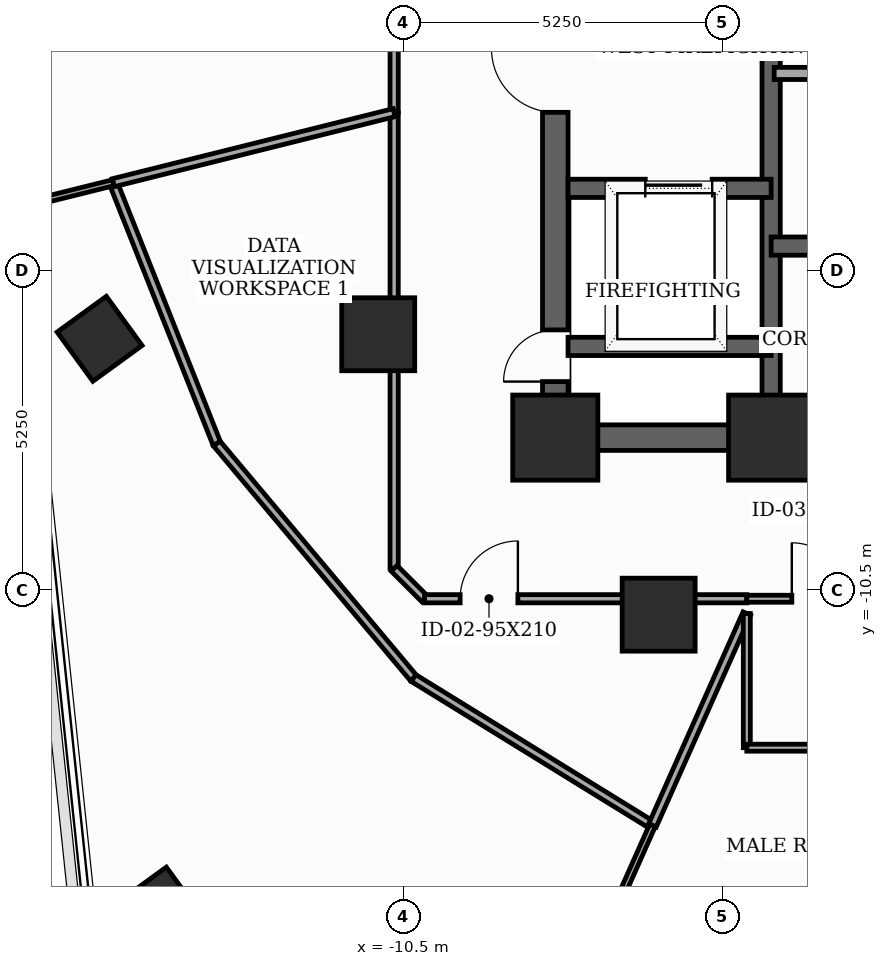
"""IFC4 building model, lengths in metres.
Left out: names, types, materials, properties, quantities, classifications, styles, units other than length and angle.
Written with IfcOpenShell. Run it as: python <this file> out.ifc"""

import sys

from ifc_helpers import new_model, si_unit, direction, frame, frame_2d, origin, origin_2d, place, context, subcontext, project, spatial, rectangle, extrude, element, fill, save


model = new_model("IFC4")
c1 = context("Model", 3, precision=1e-05, world=origin(), true_north=direction((0.0, 1.0)))
c2 = subcontext(c1, "Body", "Model", "MODEL_VIEW")
j1 = project(units=[si_unit("LENGTHUNIT", "METRE"), si_unit("PLANEANGLEUNIT", "RADIAN")], contexts=[c1])
p1 = place(None, origin())
s1 = spatial("IfcSite", under=j1, at=p1, CompositionType="ELEMENT")
p2 = place(p1, origin())
s2 = spatial("IfcBuilding", under=s1, at=p2, CompositionType="ELEMENT")
p3 = place(p2, frame((0.0, 0.0, 176.8)))
s3 = spatial("IfcBuildingStorey", under=s2, at=p3, CompositionType="ELEMENT", Elevation=176.8)
for number, where, z_axis, x_axis in (
    (1, (-8.0, -8.0, 0.0), (0.0, 0.0, 1.0), (1.0, 0.0, 0.0)),
    (2, (-4.45, -8.0, 0.0), (0.0, 0.0, 1.0), (1.0, 0.0, 0.0)),
):
    element("IfcColumn", number, at=place(p3, frame(where, z_axis=z_axis, x_axis=x_axis)), inside=s3, PredefinedType="COLUMN", context=c2, shape_type="SweptSolid", body=[
        extrude(rectangle(XDim=1.4, YDim=1.4, at=origin_2d()), origin(), (0.0, 0.0, 1.0), 3.7),
    ])
for number, where, z_axis, x_axis in (
    (3, (-10.912, -6.3, 0.0), (0.0, 0.0, 1.0), (1.0, 0.0, 0.0)),
    (4, (-6.3, -10.912, 0.0), (0.0, 0.0, 1.0), (1.0, 0.0, 0.0)),
):
    element("IfcColumn", number, at=place(p3, frame(where, z_axis=z_axis, x_axis=x_axis)), inside=s3, PredefinedType="COLUMN", context=c2, shape_type="SweptSolid", body=[
        extrude(rectangle(XDim=1.2, YDim=1.2, at=origin_2d()), origin(), (0.0, 0.0, 1.0), 3.7),
    ])
for number, where, z_axis, x_axis in (
    (5, (-15.494, -6.375, 0.0), (0.0, 0.0, 1.0), (0.809, 0.588, 0.0)),
    (6, (-14.507, -15.763, 0.0), (0.0, 0.0, 1.0), (0.809, 0.588, 0.0)),
):
    element("IfcColumn", number, at=place(p3, frame(where, z_axis=z_axis, x_axis=x_axis)), inside=s3, PredefinedType="COLUMN", context=c2, shape_type="SweptSolid", body=[
        extrude(rectangle(XDim=1.0, YDim=1.0, at=origin_2d()), origin(), (0.0, 0.0, 1.0), 3.7),
    ])
p4 = place(p3, frame((-8.0, -8.0, 0.0), z_axis=(0.0, 0.0, 1.0), x_axis=(0.0, 1.0, 0.0)))
e7 = element("IfcWall", 7, at=p4, inside=s3, PredefinedType="SHEAR", context=c2, shape_type="SweptSolid", body=[
    extrude(rectangle(XDim=16.0, YDim=0.42, at=frame_2d((8.0, 0.0))), origin(), (0.0, 0.0, 1.0), 3.5),
])
p5 = place(p4, frame((0.922, 0.0, 0.0)))
e8 = element("IfcOpeningElement", 8, at=p5, cuts=e7, PredefinedType="OPENING", context=c2, shape_type="SweptSolid", body=[
    extrude(rectangle(XDim=0.85, YDim=2.02, at=frame_2d((0.425, 1.01))), frame((0.0, 0.22, 0.0), z_axis=(0.0, -1.0, 0.0), x_axis=(1.0, 0.0, 0.0)), (0.0, 0.0, 1.0), 0.44),
])
p6 = place(p4, frame((5.35, 0.0, 0.0)))
e9 = element("IfcOpeningElement", 9, at=p6, cuts=e7, PredefinedType="OPENING", context=c2, shape_type="SweptSolid", body=[
    extrude(rectangle(XDim=1.05, YDim=2.15, at=frame_2d((0.525, 1.075))), frame((0.0, 0.22, 0.0), z_axis=(0.0, -1.0, 0.0), x_axis=(1.0, 0.0, 0.0)), (0.0, 0.0, 1.0), 0.44),
])
p7 = place(p3, frame((-8.0, -8.0, 0.0), z_axis=(0.0, 0.0, 1.0), x_axis=(1.0, 0.0, 0.0)))
e10 = element("IfcWall", 10, at=p7, inside=s3, PredefinedType="SHEAR", context=c2, shape_type="SweptSolid", body=[
    extrude(rectangle(XDim=16.0, YDim=0.42, at=frame_2d((8.0, 0.0))), origin(), (0.0, 0.0, 1.0), 3.5),
])
p8 = place(p7, frame((4.449, 0.0, 0.0)))
e11 = element("IfcOpeningElement", 11, at=p8, cuts=e10, PredefinedType="OPENING", context=c2, shape_type="SweptSolid", body=[
    extrude(rectangle(XDim=0.85, YDim=2.02, at=frame_2d((0.425, 1.01))), frame((0.0, 0.22, 0.0), z_axis=(0.0, -1.0, 0.0), x_axis=(1.0, 0.0, 0.0)), (0.0, 0.0, 1.0), 0.44),
])
p9 = place(p7, frame((6.49, 0.0, 0.0)))
e12 = element("IfcOpeningElement", 12, at=p9, cuts=e10, PredefinedType="OPENING", context=c2, shape_type="SweptSolid", body=[
    extrude(rectangle(XDim=0.85, YDim=2.02, at=frame_2d((0.425, 1.01))), frame((0.0, 0.22, 0.0), z_axis=(0.0, -1.0, 0.0), x_axis=(1.0, 0.0, 0.0)), (0.0, 0.0, 1.0), 0.44),
])
p10 = place(p7, frame((8.69, 0.0, 0.0)))
e13 = element("IfcOpeningElement", 13, at=p10, cuts=e10, PredefinedType="OPENING", context=c2, shape_type="SweptSolid", body=[
    extrude(rectangle(XDim=0.85, YDim=2.02, at=frame_2d((0.425, 1.01))), frame((0.0, 0.22, 0.0), z_axis=(0.0, -1.0, 0.0), x_axis=(1.0, 0.0, 0.0)), (0.0, 0.0, 1.0), 0.44),
])
p11 = place(p7, frame((10.701, 0.0, 0.0)))
e14 = element("IfcOpeningElement", 14, at=p11, cuts=e10, PredefinedType="OPENING", context=c2, shape_type="SweptSolid", body=[
    extrude(rectangle(XDim=0.85, YDim=2.02, at=frame_2d((0.425, 1.01))), frame((0.0, 0.22, 0.0), z_axis=(0.0, -1.0, 0.0), x_axis=(1.0, 0.0, 0.0)), (0.0, 0.0, 1.0), 0.44),
])
p12 = place(p3, frame((-4.45, -7.79, 0.0), z_axis=(0.0, 0.0, 1.0), x_axis=(0.0, 1.0, 0.0)))
e15 = element("IfcWall", 15, at=p12, inside=s3, PredefinedType="SHEAR", context=c2, shape_type="SweptSolid", body=[
    extrude(rectangle(XDim=15.58, YDim=0.3, at=frame_2d((7.79, 0.0))), origin(), (0.0, 0.0, 1.0), 3.5),
])
p13 = place(p3, frame((-7.79, -3.9, 0.0), z_axis=(0.0, 0.0, 1.0), x_axis=(1.0, 0.0, 0.0)))
e16 = element("IfcWall", 16, at=p13, inside=s3, PredefinedType="SHEAR", context=c2, shape_type="SweptSolid", body=[
    extrude(rectangle(XDim=3.34, YDim=0.3, at=frame_2d((1.67, 0.0))), origin(), (0.0, 0.0, 1.0), 3.5),
])
p14 = place(p13, frame((1.27, 0.0, 0.0)))
e17 = element("IfcOpeningElement", 17, at=p14, cuts=e16, PredefinedType="OPENING", context=c2, shape_type="SweptSolid", body=[
    extrude(rectangle(XDim=1.1, YDim=2.1, at=frame_2d((0.55, 1.05))), frame((0.0, 0.16, 0.0), z_axis=(0.0, -1.0, 0.0), x_axis=(1.0, 0.0, 0.0)), (0.0, 0.0, 1.0), 0.32),
])
p15 = place(p3, frame((-7.79, -6.5, 0.0), z_axis=(0.0, 0.0, 1.0), x_axis=(1.0, 0.0, 0.0)))
e18 = element("IfcWall", 18, at=p15, inside=s3, PredefinedType="SHEAR", context=c2, shape_type="SweptSolid", body=[
    extrude(rectangle(XDim=3.34, YDim=0.3, at=frame_2d((1.67, 0.0))), origin(), (0.0, 0.0, 1.0), 3.5),
])
p16 = place(p3, frame((-4.45, -4.85, 0.0), z_axis=(0.0, 0.0, 1.0), x_axis=(1.0, 0.0, 0.0)))
e19 = element("IfcWall", 19, at=p16, inside=s3, PredefinedType="SHEAR", context=c2, shape_type="SweptSolid", body=[
    extrude(rectangle(XDim=8.9, YDim=0.3, at=frame_2d((4.45, 0.0))), origin(), (0.0, 0.0, 1.0), 3.5),
])
p17 = place(p3, frame((-4.4, -2.01, 0.0), z_axis=(0.0, 0.0, 1.0), x_axis=(1.0, 0.0, 0.0)))
e20 = element("IfcWall", 20, at=p17, inside=s3, PredefinedType="SOLIDWALL", context=c2, shape_type="SweptSolid", body=[
    extrude(rectangle(XDim=2.68, YDim=0.2, at=frame_2d((1.34, 0.0))), origin(), (0.0, 0.0, 1.0), 3.5),
])
p18 = place(p3, frame((-10.65, -2.655, 0.0), z_axis=(0.0, 0.0, 1.0), x_axis=(0.0, -1.0, 0.0)))
e21 = element("IfcWall", 21, at=p18, inside=s3, PredefinedType="PARTITIONING", context=c2, shape_type="SweptSolid", body=[
    extrude(rectangle(XDim=7.495, YDim=0.135, at=frame_2d((3.748, 0.0))), origin(), (0.0, 0.0, 1.0), 2.885),
])
p19 = place(p3, frame((-10.65, -10.15, 0.0), z_axis=(0.0, 0.0, 1.0), x_axis=(0.707106781187, -0.707106781187, 0.0)))
e22 = element("IfcWall", 22, at=p19, inside=s3, PredefinedType="PARTITIONING", context=c2, shape_type="SweptSolid", body=[
    extrude(rectangle(XDim=0.707, YDim=0.135, at=frame_2d((0.354, 0.0))), origin(), (0.0, 0.0, 1.0), 3.5),
])
p20 = place(p3, frame((-10.15, -10.65, 0.0), z_axis=(0.0, 0.0, 1.0), x_axis=(1.0, 0.0, 0.0)))
e23 = element("IfcWall", 23, at=p20, inside=s3, PredefinedType="PARTITIONING", context=c2, shape_type="SweptSolid", body=[
    extrude(rectangle(XDim=5.3, YDim=0.135, at=frame_2d((2.65, 0.0))), origin(), (0.0, 0.0, 1.0), 2.885),
])
p21 = place(p20, frame((0.585, 0.0, 0.0)))
e24 = element("IfcOpeningElement", 24, at=p21, cuts=e23, PredefinedType="OPENING", context=c2, shape_type="SweptSolid", body=[
    extrude(rectangle(XDim=0.95, YDim=2.1, at=frame_2d((0.475, 1.05))), frame((0.0, 0.077, 0.0), z_axis=(0.0, -1.0, 0.0), x_axis=(1.0, 0.0, 0.0)), (0.0, 0.0, 1.0), 0.155),
])
p22 = place(p3, frame((-4.85, -10.65, 0.0), z_axis=(0.0, 0.0, 1.0), x_axis=(1.0, 0.0, 0.0)))
e25 = element("IfcWall", 25, at=p22, inside=s3, PredefinedType="PARTITIONING", context=c2, shape_type="SweptSolid", body=[
    extrude(rectangle(XDim=2.4, YDim=0.115, at=frame_2d((1.2, 0.0))), origin(), (0.0, 0.0, 1.0), 3.5),
])
p23 = place(p22, frame((0.74, 0.0, 0.0)))
e26 = element("IfcOpeningElement", 26, at=p23, cuts=e25, PredefinedType="OPENING", context=c2, shape_type="SweptSolid", body=[
    extrude(rectangle(XDim=0.92, YDim=2.1, at=frame_2d((0.46, 1.05))), frame((0.0, 0.067, 0.0), z_axis=(0.0, -1.0, 0.0), x_axis=(1.0, 0.0, 0.0)), (0.0, 0.0, 1.0), 0.135),
])
p24 = place(p3, frame((-10.65, 10.15, 0.0), z_axis=(0.0, 0.0, 1.0), x_axis=(0.0, -1.0, 0.0)))
e27 = element("IfcWall", 27, at=p24, inside=s3, PredefinedType="PARTITIONING", context=c2, shape_type="SweptSolid", body=[
    extrude(rectangle(XDim=12.805, YDim=0.135, at=frame_2d((6.402, 0.0))), origin(), (0.0, 0.0, 1.0), 2.885),
])
p25 = place(p24, frame((5.927, 0.0, 0.0)))
e28 = element("IfcOpeningElement", 28, at=p25, cuts=e27, PredefinedType="OPENING", context=c2, shape_type="SweptSolid", body=[
    extrude(rectangle(XDim=0.95, YDim=2.1, at=frame_2d((0.475, 1.05))), frame((0.0, 0.077, 0.0), z_axis=(0.0, -1.0, 0.0), x_axis=(1.0, 0.0, 0.0)), (0.0, 0.0, 1.0), 0.155),
])
p26 = place(p3, frame((-15.271, -3.808, 0.0), z_axis=(0.0, 0.0, 1.0), x_axis=(0.369182774414, -0.929356809345, 0.0)))
e29 = element("IfcWall", 29, at=p26, inside=s3, PredefinedType="PARTITIONING", context=c2, shape_type="SweptSolid", body=[
    extrude(rectangle(XDim=4.616, YDim=0.135, at=frame_2d((2.308, 0.0))), origin(), (0.0, 0.0, 1.0), 2.885),
])
p27 = place(p3, frame((-13.567, -8.098, 0.0), z_axis=(0.0, 0.0, 1.0), x_axis=(0.642704085781, -0.766114520239, 0.0)))
e30 = element("IfcWall", 30, at=p27, inside=s3, PredefinedType="PARTITIONING", context=c2, shape_type="SweptSolid", body=[
    extrude(rectangle(XDim=5.035, YDim=0.135, at=frame_2d((2.517, 0.0))), origin(), (0.0, 0.0, 1.0), 3.5),
])
p28 = place(p3, frame((-10.331, -11.955, 0.0), z_axis=(0.0, 0.0, 1.0), x_axis=(0.851171263557, -0.524888064347, 0.0)))
e31 = element("IfcWall", 31, at=p28, inside=s3, PredefinedType="PARTITIONING", context=c2, shape_type="SweptSolid", body=[
    extrude(rectangle(XDim=4.616, YDim=0.135, at=frame_2d((2.308, 0.0))), origin(), (0.0, 0.0, 1.0), 2.885),
])
p29 = place(p3, frame((-6.402, -14.378, 0.0), z_axis=(0.0, 0.0, 1.0), x_axis=(0.406833086098, 0.913502512343, 0.0)))
e32 = element("IfcWall", 32, at=p29, inside=s3, PredefinedType="PARTITIONING", context=c2, shape_type="SweptSolid", body=[
    extrude(rectangle(XDim=3.815, YDim=0.135, at=frame_2d((1.907, 0.0))), origin(), (0.0, 0.0, 1.0), 2.885),
])
p30 = place(p3, frame((-10.65, -2.655, 0.0), z_axis=(0.0, 0.0, 1.0), x_axis=(-0.970250953753, -0.242101397643, 0.0)))
e33 = element("IfcWall", 33, at=p30, inside=s3, PredefinedType="PARTITIONING", context=c2, shape_type="SweptSolid", body=[
    extrude(rectangle(XDim=4.763, YDim=0.135, at=frame_2d((2.381, 0.0))), origin(), (0.0, 0.0, 1.0), 2.885),
])
p31 = place(p3, frame((-12.555, -28.199, 0.0), z_axis=(0.0, 0.0, 1.0), x_axis=(0.406672919663, 0.913573826471, 0.0)))
e34 = element("IfcWall", 34, at=p31, inside=s3, PredefinedType="MOVABLE", context=c2, shape_type="SweptSolid", body=[
    extrude(rectangle(XDim=15.129, YDim=0.1, at=frame_2d((7.564, 0.0))), origin(), (0.0, 0.0, 1.0), 2.985),
])
p32 = place(p31, frame((7.104, 0.0, 0.0)))
e35 = element("IfcOpeningElement", 35, at=p32, cuts=e34, PredefinedType="OPENING", context=c2, shape_type="SweptSolid", body=[
    extrude(rectangle(XDim=0.92, YDim=2.1, at=frame_2d((0.46, 1.05))), frame((0.0, 0.06, 0.0), z_axis=(0.0, -1.0, 0.0), x_axis=(1.0, 0.0, 0.0)), (0.0, 0.0, 1.0), 0.12),
])
p33 = place(p3, frame((-15.271, -3.808, 0.0), z_axis=(0.0, 0.0, 1.0), x_axis=(-0.970407499575, -0.24147315538, 0.0)))
e36 = element("IfcWall", 36, at=p33, inside=s3, PredefinedType="MOVABLE", context=c2, shape_type="SweptSolid", body=[
    extrude(rectangle(XDim=1.676, YDim=0.1, at=frame_2d((0.838, 0.0))), origin(), (0.0, 0.0, 1.0), 2.985),
])
p34 = place(p3, frame((-4.85, -10.893, 0.0), z_axis=(0.0, 0.0, 1.0), x_axis=(0.0, -1.0, 0.0)))
e37 = element("IfcWall", 37, at=p34, inside=s3, PredefinedType="PARTITIONING", context=c2, shape_type="SweptSolid", body=[
    extrude(rectangle(XDim=2.207, YDim=0.115, at=frame_2d((1.104, 0.0))), origin(), (0.0, 0.0, 1.0), 2.885),
])
p35 = place(p3, frame((-4.85, -13.1, 0.0), z_axis=(0.0, 0.0, 1.0), x_axis=(1.0, 0.0, 0.0)))
e38 = element("IfcWall", 38, at=p35, inside=s3, PredefinedType="PARTITIONING", context=c2, shape_type="SweptSolid", body=[
    extrude(rectangle(XDim=2.4, YDim=0.115, at=frame_2d((1.2, 0.0))), origin(), (0.0, 0.0, 1.0), 3.5),
])
p36 = place(p5, origin())
e39 = element("IfcDoor", 39, at=p36, inside=s3, OperationType="SINGLE_SWING_LEFT", PredefinedType="TRAPDOOR", context=c2, shape_type="SweptSolid", body=[
    extrude(rectangle(XDim=0.85, YDim=2.02, at=frame_2d((0.425, 1.01))), frame((0.0, 0.025, 0.0), z_axis=(0.0, -1.0, 0.0), x_axis=(1.0, 0.0, 0.0)), (0.0, 0.0, 1.0), 0.05),
])
fill(e8, e39)
p37 = place(p6, origin())
e40 = element("IfcDoor", 40, at=p37, inside=s3, OperationType="SINGLE_SWING_RIGHT", PredefinedType="DOOR", context=c2, shape_type="SweptSolid", body=[
    extrude(rectangle(XDim=1.05, YDim=2.15, at=frame_2d((0.525, 1.075))), frame((0.0, 0.025, 0.0), z_axis=(0.0, -1.0, 0.0), x_axis=(1.0, 0.0, 0.0)), (0.0, 0.0, 1.0), 0.05),
])
fill(e9, e40)
p38 = place(p14, origin())
e41 = element("IfcDoor", 41, at=p38, inside=s3, OperationType="SLIDING_TO_LEFT", PredefinedType="DOOR", context=c2, shape_type="SweptSolid", body=[
    extrude(rectangle(XDim=1.1, YDim=2.1, at=frame_2d((0.55, 1.05))), frame((0.0, 0.025, 0.0), z_axis=(0.0, -1.0, 0.0), x_axis=(1.0, 0.0, 0.0)), (0.0, 0.0, 1.0), 0.05),
])
fill(e17, e41)
p39 = place(p21, origin())
e42 = element("IfcDoor", 42, at=p39, inside=s3, OperationType="SINGLE_SWING_RIGHT", PredefinedType="DOOR", context=c2, shape_type="SweptSolid", body=[
    extrude(rectangle(XDim=0.95, YDim=2.1, at=frame_2d((0.475, 1.05))), frame((0.0, 0.025, 0.0), z_axis=(0.0, -1.0, 0.0), x_axis=(1.0, 0.0, 0.0)), (0.0, 0.0, 1.0), 0.05),
])
fill(e24, e42)
p40 = place(p23, origin())
e43 = element("IfcDoor", 43, at=p40, inside=s3, OperationType="SINGLE_SWING_LEFT", PredefinedType="DOOR", context=c2, shape_type="SweptSolid", body=[
    extrude(rectangle(XDim=0.92, YDim=2.1, at=frame_2d((0.46, 1.05))), frame((0.0, 0.025, 0.0), z_axis=(0.0, -1.0, 0.0), x_axis=(1.0, 0.0, 0.0)), (0.0, 0.0, 1.0), 0.05),
])
fill(e26, e43)
save(model, sys.argv[1])
